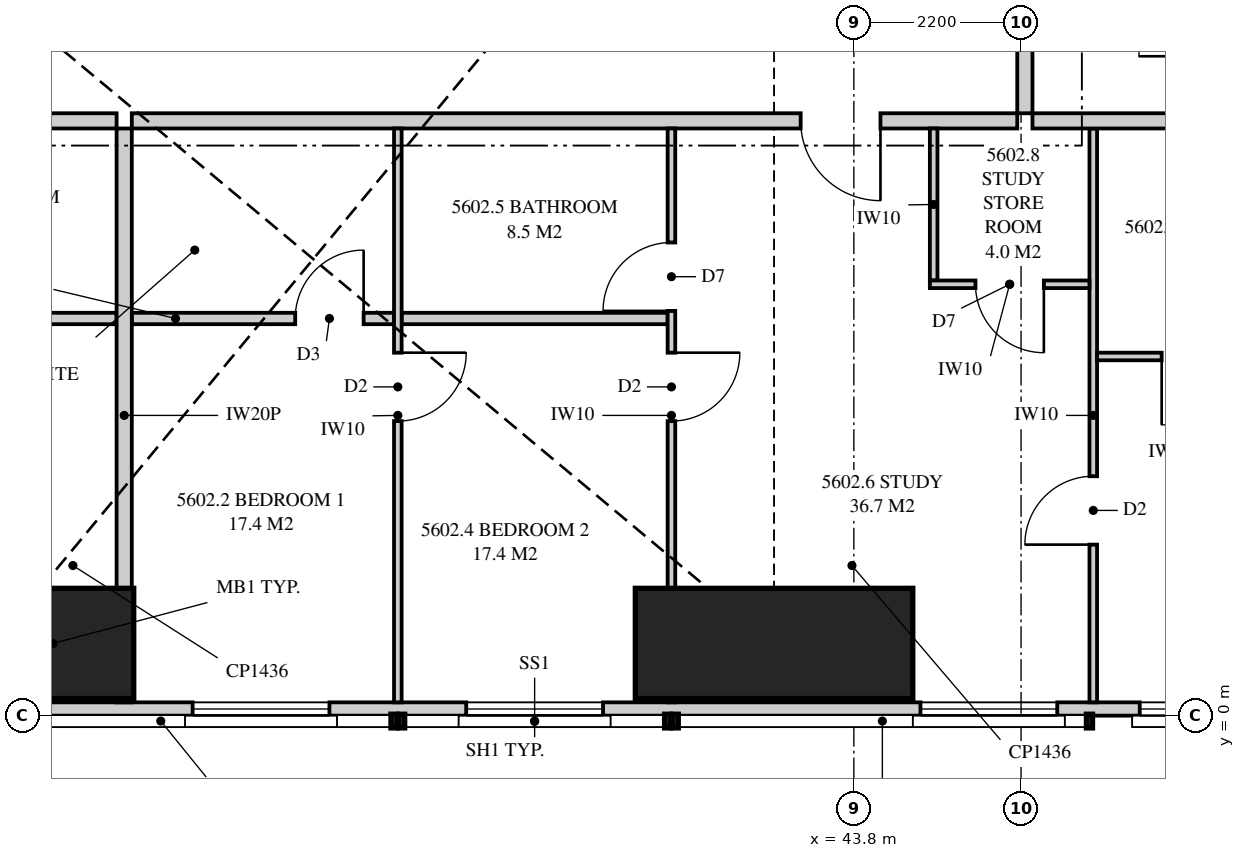
"""IFC4 building model, lengths in metres.
Left out: names, types, materials, properties, quantities, classifications, styles, units other than length and angle.
Written with IfcOpenShell. Run it as: python <this file> out.ifc"""

import sys

from ifc_helpers import new_model, si_unit, direction, frame, frame_2d, origin, origin_2d, place, context, subcontext, project, spatial, polyline, rectangle, outline, extrude, element, fill, save


model = new_model("IFC4")
c1 = context("Model", 3, precision=1e-05, world=origin(), true_north=direction((0.0, 1.0)))
c2 = subcontext(c1, "Body", "Model", "MODEL_VIEW")
j1 = project(units=[si_unit("LENGTHUNIT", "METRE"), si_unit("PLANEANGLEUNIT", "RADIAN")], contexts=[c1])
p1 = place(None, origin())
s1 = spatial("IfcSite", under=j1, at=p1, CompositionType="ELEMENT")
p2 = place(p1, origin())
s2 = spatial("IfcBuilding", under=s1, at=p2, CompositionType="ELEMENT")
p3 = place(p2, frame((0.0, 0.0, 204.6)))
s3 = spatial("IfcBuildingStorey", under=s2, at=p3, CompositionType="ELEMENT", Elevation=204.6)
for number, where, z_axis, x_axis in (
    (1, (32.5, 0.95, 0.0), (0.0, 0.0, 1.0), (0.0, 1.0, 0.0)),
    (2, (42.75, 0.95, 0.0), (0.0, 0.0, 1.0), (0.0, 1.0, 0.0)),
):
    element("IfcColumn", number, at=place(p3, frame(where, z_axis=z_axis, x_axis=x_axis)), inside=s3, PredefinedType="COLUMN", context=c2, shape_type="SweptSolid", body=[
        extrude(rectangle(XDim=1.45, YDim=3.65, at=origin_2d()), origin(), (0.0, 0.0, 1.0), 3.35),
    ])
p4 = place(p3, frame((15.051, 0.087, 0.0), z_axis=(0.0, 0.0, 1.0), x_axis=(1.0, 0.0, 0.0)))
e3 = element("IfcWall", 3, at=p4, inside=s3, PredefinedType="SOLIDWALL", context=c2, shape_type="SweptSolid", body=[
    extrude(rectangle(XDim=34.897, YDim=0.175, at=frame_2d((17.449, 0.0))), origin(), (0.0, 0.0, 1.0), 3.07),
])
p5 = place(p4, frame((0.699, 0.0, 0.4)))
e4 = element("IfcOpeningElement", 4, at=p5, cuts=e3, PredefinedType="OPENING", context=c2, shape_type="SweptSolid", body=[
    extrude(rectangle(XDim=1.8, YDim=1.7, at=frame_2d((0.9, 0.85))), frame((0.0, 0.097, 0.0), z_axis=(0.0, -1.0, 0.0), x_axis=(1.0, 0.0, 0.0)), (0.0, 0.0, 1.0), 0.195),
])
p6 = place(p4, frame((9.274, 0.0, 0.4)))
e5 = element("IfcOpeningElement", 5, at=p6, cuts=e3, PredefinedType="OPENING", context=c2, shape_type="SweptSolid", body=[
    extrude(rectangle(XDim=2.4, YDim=1.7, at=frame_2d((1.2, 0.85))), frame((0.0, 0.097, 0.0), z_axis=(0.0, -1.0, 0.0), x_axis=(1.0, 0.0, 0.0)), (0.0, 0.0, 1.0), 0.195),
])
p7 = place(p4, frame((13.561, 0.0, 0.0)))
e6 = element("IfcOpeningElement", 6, at=p7, cuts=e3, PredefinedType="OPENING", context=c2, shape_type="SweptSolid", body=[
    extrude(rectangle(XDim=1.8, YDim=2.1, at=frame_2d((0.9, 1.05))), frame((0.0, 0.097, 0.0), z_axis=(0.0, -1.0, 0.0), x_axis=(1.0, 0.0, 0.0)), (0.0, 0.0, 1.0), 0.195),
])
p8 = place(p4, frame((20.049, 0.0, 0.4)))
e7 = element("IfcOpeningElement", 7, at=p8, cuts=e3, PredefinedType="OPENING", context=c2, shape_type="SweptSolid", body=[
    extrude(rectangle(XDim=1.8, YDim=1.7, at=frame_2d((0.9, 0.85))), frame((0.0, 0.097, 0.0), z_axis=(0.0, -1.0, 0.0), x_axis=(1.0, 0.0, 0.0)), (0.0, 0.0, 1.0), 0.195),
])
p9 = place(p4, frame((23.649, 0.0, 0.4)))
e8 = element("IfcOpeningElement", 8, at=p9, cuts=e3, PredefinedType="OPENING", context=c2, shape_type="SweptSolid", body=[
    extrude(rectangle(XDim=1.8, YDim=1.7, at=frame_2d((0.9, 0.85))), frame((0.0, 0.097, 0.0), z_axis=(0.0, -1.0, 0.0), x_axis=(1.0, 0.0, 0.0)), (0.0, 0.0, 1.0), 0.195),
])
p10 = place(p4, frame((29.625, 0.0, 0.4)))
e9 = element("IfcOpeningElement", 9, at=p10, cuts=e3, PredefinedType="OPENING", context=c2, shape_type="SweptSolid", body=[
    extrude(rectangle(XDim=1.8, YDim=1.7, at=frame_2d((0.9, 0.85))), frame((0.0, 0.097, 0.0), z_axis=(0.0, -1.0, 0.0), x_axis=(1.0, 0.0, 0.0)), (0.0, 0.0, 1.0), 0.195),
])
p11 = place(p4, frame((32.51, 0.0, 0.4)))
e10 = element("IfcOpeningElement", 10, at=p11, cuts=e3, PredefinedType="OPENING", context=c2, shape_type="SweptSolid", body=[
    extrude(rectangle(XDim=1.8, YDim=1.7, at=frame_2d((0.9, 0.85))), frame((0.0, 0.097, 0.0), z_axis=(0.0, -1.0, 0.0), x_axis=(1.0, 0.0, 0.0)), (0.0, 0.0, 1.0), 0.195),
])
p12 = place(p3, frame((34.2, 0.175, 0.0), z_axis=(0.0, 0.0, 1.0), x_axis=(0.0, 1.0, 0.0)))
e11 = element("IfcWall", 11, at=p12, inside=s3, PredefinedType="PARTITIONING", context=c2, shape_type="SweptSolid", body=[
    extrude(outline(polyline([(0.0, 0.0), (7.55, 0.0), (7.55, 2.491), (7.515, 2.491), (7.515, 3.07), (3.319, 3.07), (3.319, 2.491), (2.337, 2.491), (2.337, 3.07), (1.275, 3.07), (1.275, 2.07), (0.275, 2.07), (0.275, 3.07), (0.0, 3.07), (0.0, 0.0)])), frame((0.0, 0.1, 0.0), z_axis=(0.0, -1.0, 0.0), x_axis=(1.0, 0.0, 0.0)), (0.0, 0.0, 1.0), 0.2),
])
p13 = place(p3, frame((28.4, 5.225, 0.0), z_axis=(0.0, 0.0, 1.0), x_axis=(1.0, 0.0, 0.0)))
e12 = element("IfcWall", 12, at=p13, inside=s3, PredefinedType="PLUMBINGWALL", context=c2, shape_type="SweptSolid", body=[
    extrude(outline(polyline([(0.0, 0.0), (5.7, 0.0), (5.7, 3.07), (4.356, 3.07), (4.356, 2.595), (3.844, 2.595), (3.844, 3.07), (0.408, 3.07), (0.408, 2.491), (0.0, 2.491), (0.0, 0.0)])), frame((0.0, 0.075, 0.0), z_axis=(0.0, -1.0, 0.0), x_axis=(1.0, 0.0, 0.0)), (0.0, 0.0, 1.0), 0.15),
])
p14 = place(p13, frame((0.4, 0.0, 0.0)))
e13 = element("IfcOpeningElement", 13, at=p14, cuts=e12, PredefinedType="OPENING", context=c2, shape_type="SweptSolid", body=[
    extrude(rectangle(XDim=0.9, YDim=2.1, at=frame_2d((0.45, 1.05))), frame((0.0, 0.085, 0.0), z_axis=(0.0, -1.0, 0.0), x_axis=(1.0, 0.0, 0.0)), (0.0, 0.0, 1.0), 0.17),
])
p15 = place(p3, frame((34.3, 7.825, 0.0), z_axis=(0.0, 0.0, 1.0), x_axis=(1.0, 0.0, 0.0)))
e14 = element("IfcWall", 14, at=p15, inside=s3, PredefinedType="PARTITIONING", context=c2, shape_type="SweptSolid", body=[
    extrude(outline(polyline([(0.0, 0.0), (11.65, 0.0), (11.65, 3.07), (9.16, 3.07), (9.16, 2.47), (7.74, 2.47), (7.74, 3.07), (4.282, 3.07), (4.282, 2.491), (3.503, 2.491), (3.503, 3.07), (0.696, 3.07), (0.696, 2.491), (0.0, 2.491), (0.0, 0.0)])), frame((0.0, 0.1, 0.0), z_axis=(0.0, -1.0, 0.0), x_axis=(1.0, 0.0, 0.0)), (0.0, 0.0, 1.0), 0.2),
])
p16 = place(p15, frame((8.8, 0.0, 0.0)))
e15 = element("IfcOpeningElement", 15, at=p16, cuts=e14, PredefinedType="OPENING", context=c2, shape_type="SweptSolid", body=[
    extrude(rectangle(XDim=1.05, YDim=2.2, at=frame_2d((0.525, 1.1))), frame((0.0, 0.11, 0.0), z_axis=(0.0, -1.0, 0.0), x_axis=(1.0, 0.0, 0.0)), (0.0, 0.0, 1.0), 0.22),
])
p17 = place(p3, frame((37.8, 0.175, 0.0), z_axis=(0.0, 0.0, 1.0), x_axis=(0.0, 1.0, 0.0)))
e16 = element("IfcWall", 16, at=p17, inside=s3, PredefinedType="PARTITIONING", context=c2, shape_type="SweptSolid", body=[
    extrude(outline(polyline([(0.0, 0.0), (7.55, 0.0), (7.55, 2.491), (6.746, 2.491), (6.746, 3.07), (5.253, 3.07), (5.253, 2.491), (4.554, 2.491), (4.554, 3.07), (1.275, 3.07), (1.275, 2.07), (0.275, 2.07), (0.275, 3.07), (0.0, 3.07), (0.0, 0.0)])), frame((0.0, 0.05, 0.0), z_axis=(0.0, -1.0, 0.0), x_axis=(1.0, 0.0, 0.0)), (0.0, 0.0, 1.0), 0.1),
])
p18 = place(p17, frame((3.7, 0.0, 0.0)))
e17 = element("IfcOpeningElement", 17, at=p18, cuts=e16, PredefinedType="OPENING", context=c2, shape_type="SweptSolid", body=[
    extrude(rectangle(XDim=0.9, YDim=2.1, at=frame_2d((0.45, 1.05))), frame((0.0, 0.06, 0.0), z_axis=(0.0, -1.0, 0.0), x_axis=(1.0, 0.0, 0.0)), (0.0, 0.0, 1.0), 0.12),
])
p19 = place(p3, frame((41.4, 0.175, 0.0), z_axis=(0.0, 0.0, 1.0), x_axis=(0.0, 1.0, 0.0)))
e18 = element("IfcWall", 18, at=p19, inside=s3, PredefinedType="PARTITIONING", context=c2, shape_type="SweptSolid", body=[
    extrude(outline(polyline([(7.55, 0.0), (7.55, 3.07), (2.25, 3.07), (2.25, 2.491), (1.552, 2.491), (1.552, 3.07), (1.275, 3.07), (1.275, 2.07), (1.021, 2.07), (1.021, 2.063), (0.529, 2.063), (0.529, 2.07), (0.275, 2.07), (0.275, 3.07), (0.0, 3.07), (0.0, 0.0), (0.529, 0.0), (0.529, 0.087), (1.021, 0.087), (1.021, 0.0), (7.55, 0.0)])), frame((0.0, 0.05, 0.0), z_axis=(0.0, -1.0, 0.0), x_axis=(1.0, 0.0, 0.0)), (0.0, 0.0, 1.0), 0.1),
])
p20 = place(p19, frame((3.7, 0.0, 0.0)))
e19 = element("IfcOpeningElement", 19, at=p20, cuts=e18, PredefinedType="OPENING", context=c2, shape_type="SweptSolid", body=[
    extrude(rectangle(XDim=0.9, YDim=2.1, at=frame_2d((0.45, 1.05))), frame((0.0, 0.06, 0.0), z_axis=(0.0, -1.0, 0.0), x_axis=(1.0, 0.0, 0.0)), (0.0, 0.0, 1.0), 0.12),
])
p21 = place(p19, frame((5.15, 0.0, 0.0)))
e20 = element("IfcOpeningElement", 20, at=p21, cuts=e18, PredefinedType="OPENING", context=c2, shape_type="SweptSolid", body=[
    extrude(rectangle(XDim=0.9, YDim=2.1, at=frame_2d((0.45, 1.05))), frame((0.0, 0.06, 0.0), z_axis=(0.0, -1.0, 0.0), x_axis=(1.0, 0.0, 0.0)), (0.0, 0.0, 1.0), 0.12),
])
p22 = place(p3, frame((34.3, 5.225, 0.0), z_axis=(0.0, 0.0, 1.0), x_axis=(1.0, 0.0, 0.0)))
e21 = element("IfcWall", 21, at=p22, inside=s3, PredefinedType="PLUMBINGWALL", context=c2, shape_type="SweptSolid", body=[
    extrude(outline(polyline([(0.0, 0.0), (3.45, 0.0), (3.45, 2.491), (2.866, 2.491), (2.866, 3.07), (2.108, 3.07), (2.108, 2.491), (1.371, 2.491), (1.371, 3.07), (0.0, 3.07), (0.0, 0.0)])), frame((0.0, 0.075, 0.0), z_axis=(0.0, -1.0, 0.0), x_axis=(1.0, 0.0, 0.0)), (0.0, 0.0, 1.0), 0.15),
])
p23 = place(p22, frame((2.15, 0.0, 0.0)))
e22 = element("IfcOpeningElement", 22, at=p23, cuts=e21, PredefinedType="OPENING", context=c2, shape_type="SweptSolid", body=[
    extrude(rectangle(XDim=0.9, YDim=2.1, at=frame_2d((0.45, 1.05))), frame((0.0, 0.085, 0.0), z_axis=(0.0, -1.0, 0.0), x_axis=(1.0, 0.0, 0.0)), (0.0, 0.0, 1.0), 0.17),
])
p24 = place(p3, frame((37.85, 5.225, 0.0), z_axis=(0.0, 0.0, 1.0), x_axis=(1.0, 0.0, 0.0)))
e23 = element("IfcWall", 23, at=p24, inside=s3, PredefinedType="PLUMBINGWALL", context=c2, shape_type="SweptSolid", body=[
    extrude(outline(polyline([(0.0, 0.0), (3.5, 0.0), (3.5, 3.07), (0.233, 3.07), (0.233, 2.491), (0.0, 2.491), (0.0, 0.0)])), frame((0.0, 0.075, 0.0), z_axis=(0.0, -1.0, 0.0), x_axis=(1.0, 0.0, 0.0)), (0.0, 0.0, 1.0), 0.15),
])
p25 = place(p3, frame((46.95, 0.175, 0.0), z_axis=(0.0, 0.0, 1.0), x_axis=(0.0, 1.0, 0.0)))
e24 = element("IfcWall", 24, at=p25, inside=s3, PredefinedType="PARTITIONING", context=c2, shape_type="SweptSolid", body=[
    extrude(outline(polyline([(0.0, 0.0), (7.55, 0.0), (7.55, 3.07), (2.035, 3.07), (2.035, 2.07), (1.002, 2.07), (1.002, 3.07), (0.0, 3.07), (0.0, 0.0)])), frame((0.0, 0.05, 0.0), z_axis=(0.0, -1.0, 0.0), x_axis=(1.0, 0.0, 0.0)), (0.0, 0.0, 1.0), 0.1),
])
p26 = place(p25, frame((2.075, 0.0, 0.0)))
e25 = element("IfcOpeningElement", 25, at=p26, cuts=e24, PredefinedType="OPENING", context=c2, shape_type="SweptSolid", body=[
    extrude(rectangle(XDim=0.9, YDim=2.1, at=frame_2d((0.45, 1.05))), frame((0.0, 0.06, 0.0), z_axis=(0.0, -1.0, 0.0), x_axis=(1.0, 0.0, 0.0)), (0.0, 0.0, 1.0), 0.12),
])
p27 = place(p3, frame((47.0, 4.725, 0.0), z_axis=(0.0, 0.0, 1.0), x_axis=(1.0, 0.0, 0.0)))
e26 = element("IfcWall", 26, at=p27, inside=s3, PredefinedType="PARTITIONING", context=c2, shape_type="SweptSolid", body=[
    extrude(rectangle(XDim=2.6, YDim=0.1, at=frame_2d((1.3, 0.0))), origin(), (0.0, 0.0, 1.0), 3.07),
])
p28 = place(p27, frame((0.85, 0.0, 0.0)))
e27 = element("IfcOpeningElement", 27, at=p28, cuts=e26, PredefinedType="OPENING", context=c2, shape_type="SweptSolid", body=[
    extrude(rectangle(XDim=0.9, YDim=2.1, at=frame_2d((0.45, 1.05))), frame((0.0, 0.06, 0.0), z_axis=(0.0, -1.0, 0.0), x_axis=(1.0, 0.0, 0.0)), (0.0, 0.0, 1.0), 0.12),
])
p29 = place(p3, frame((46.15, 7.825, 0.0), z_axis=(0.0, 0.0, 1.0), x_axis=(1.0, 0.0, 0.0)))
e28 = element("IfcWall", 28, at=p29, inside=s3, PredefinedType="PARTITIONING", context=c2, shape_type="SweptSolid", body=[
    extrude(outline(polyline([(0.0, 0.0), (6.85, 0.0), (6.85, 3.07), (5.738, 3.07), (5.738, 2.07), (4.703, 2.07), (4.703, 3.07), (0.0, 3.07), (0.0, 0.0)])), frame((0.0, 0.1, 0.0), z_axis=(0.0, -1.0, 0.0), x_axis=(1.0, 0.0, 0.0)), (0.0, 0.0, 1.0), 0.2),
])
p30 = place(p3, frame((46.05, 7.925, 0.0), z_axis=(0.0, 0.0, 1.0), x_axis=(0.0, 1.0, 0.0)))
e29 = element("IfcWall", 29, at=p30, inside=s3, PredefinedType="PARTITIONING", context=c2, shape_type="SweptSolid", body=[
    extrude(outline(polyline([(0.0, 0.0), (5.875, 0.0), (5.875, 3.07), (5.287, 3.07), (5.287, 2.595), (4.863, 2.595), (4.863, 3.07), (0.0, 3.07), (0.0, 0.0)])), frame((0.0, 0.1, 0.0), z_axis=(0.0, -1.0, 0.0), x_axis=(1.0, 0.0, 0.0)), (0.0, 0.0, 1.0), 0.2),
])
p31 = place(p30, frame((2.438, 0.0, 0.0)))
e30 = element("IfcOpeningElement", 30, at=p31, cuts=e29, PredefinedType="OPENING", context=c2, shape_type="SweptSolid", body=[
    extrude(rectangle(XDim=1.05, YDim=2.2, at=frame_2d((0.525, 1.1))), frame((0.0, 0.11, 0.0), z_axis=(0.0, -1.0, 0.0), x_axis=(1.0, 0.0, 0.0)), (0.0, 0.0, 1.0), 0.22),
])
p32 = place(p3, frame((24.5, 7.825, 0.0), z_axis=(0.0, 0.0, 1.0), x_axis=(1.0, 0.0, 0.0)))
e31 = element("IfcWall", 31, at=p32, inside=s3, PredefinedType="PARTITIONING", context=c2, shape_type="SweptSolid", body=[
    extrude(outline(polyline([(0.0, 0.0), (9.6, 0.0), (9.6, 2.491), (9.519, 2.491), (9.519, 3.07), (8.257, 3.07), (8.257, 2.595), (7.743, 2.595), (7.743, 3.07), (5.097, 3.07), (5.097, 2.491), (4.227, 2.491), (4.227, 3.07), (1.843, 3.07), (1.843, 2.491), (0.998, 2.491), (0.998, 3.07), (0.0, 3.07), (0.0, 0.0)])), frame((0.0, 0.1, 0.0), z_axis=(0.0, -1.0, 0.0), x_axis=(1.0, 0.0, 0.0)), (0.0, 0.0, 1.0), 0.2),
])
p33 = place(p3, frame((46.9, 5.675, 0.0), z_axis=(0.0, 0.0, 1.0), x_axis=(-1.0, 0.0, 0.0)))
e32 = element("IfcWall", 32, at=p33, inside=s3, PredefinedType="PARTITIONING", context=c2, shape_type="SweptSolid", body=[
    extrude(rectangle(XDim=2.1, YDim=0.1, at=frame_2d((1.05, 0.0))), origin(), (0.0, 0.0, 1.0), 3.07),
])
p34 = place(p33, frame((0.6, 0.0, 0.0)))
e33 = element("IfcOpeningElement", 33, at=p34, cuts=e32, PredefinedType="OPENING", context=c2, shape_type="SweptSolid", body=[
    extrude(rectangle(XDim=0.9, YDim=2.1, at=frame_2d((0.45, 1.05))), frame((0.0, 0.06, 0.0), z_axis=(0.0, -1.0, 0.0), x_axis=(1.0, 0.0, 0.0)), (0.0, 0.0, 1.0), 0.12),
])
p35 = place(p3, frame((44.85, 7.725, 0.0), z_axis=(0.0, 0.0, 1.0), x_axis=(0.0, -1.0, 0.0)))
e34 = element("IfcWall", 34, at=p35, inside=s3, PredefinedType="PARTITIONING", context=c2, shape_type="SweptSolid", body=[
    extrude(rectangle(XDim=2.0, YDim=0.1, at=frame_2d((1.0, 0.0))), origin(), (0.0, 0.0, 1.0), 3.07),
])
p36 = place(p8, origin())
e35 = element("IfcWindow", 35, at=p36, inside=s3, PartitioningType="SINGLE_PANEL", PredefinedType="WINDOW", context=c2, shape_type="SweptSolid", body=[
    extrude(rectangle(XDim=1.8, YDim=1.7, at=frame_2d((0.9, 0.85))), frame((0.0, 0.03, 0.0), z_axis=(0.0, -1.0, 0.0), x_axis=(1.0, 0.0, 0.0)), (0.0, 0.0, 1.0), 0.06),
])
fill(e7, e35)
p37 = place(p9, origin())
e36 = element("IfcWindow", 36, at=p37, inside=s3, PartitioningType="SINGLE_PANEL", PredefinedType="WINDOW", context=c2, shape_type="SweptSolid", body=[
    extrude(rectangle(XDim=1.8, YDim=1.7, at=frame_2d((0.9, 0.85))), frame((0.0, 0.03, 0.0), z_axis=(0.0, -1.0, 0.0), x_axis=(1.0, 0.0, 0.0)), (0.0, 0.0, 1.0), 0.06),
])
fill(e8, e36)
p38 = place(p10, origin())
e37 = element("IfcWindow", 37, at=p38, inside=s3, PartitioningType="SINGLE_PANEL", PredefinedType="WINDOW", context=c2, shape_type="SweptSolid", body=[
    extrude(rectangle(XDim=1.8, YDim=1.7, at=frame_2d((0.9, 0.85))), frame((0.0, 0.03, 0.0), z_axis=(0.0, -1.0, 0.0), x_axis=(1.0, 0.0, 0.0)), (0.0, 0.0, 1.0), 0.06),
])
fill(e9, e37)
p39 = place(p11, origin())
e38 = element("IfcWindow", 38, at=p39, inside=s3, PartitioningType="SINGLE_PANEL", PredefinedType="WINDOW", context=c2, shape_type="SweptSolid", body=[
    extrude(rectangle(XDim=1.8, YDim=1.7, at=frame_2d((0.9, 0.85))), frame((0.0, 0.03, 0.0), z_axis=(0.0, -1.0, 0.0), x_axis=(1.0, 0.0, 0.0)), (0.0, 0.0, 1.0), 0.06),
])
fill(e10, e38)
p40 = place(p16, frame((1.05, 0.0, 0.0), z_axis=(0.0, 0.0, 1.0), x_axis=(-1.0, 0.0, 0.0)))
e39 = element("IfcDoor", 39, at=p40, inside=s3, OperationType="SINGLE_SWING_LEFT", PredefinedType="DOOR", context=c2, shape_type="SweptSolid", body=[
    extrude(rectangle(XDim=1.05, YDim=2.2, at=frame_2d((0.525, 1.1))), frame((0.0, 0.025, 0.0), z_axis=(0.0, -1.0, 0.0), x_axis=(1.0, 0.0, 0.0)), (0.0, 0.0, 1.0), 0.05),
])
fill(e15, e39)
p41 = place(p18, frame((0.9, 0.0, 0.0), z_axis=(0.0, 0.0, 1.0), x_axis=(-1.0, 0.0, 0.0)))
e40 = element("IfcDoor", 40, at=p41, inside=s3, OperationType="SINGLE_SWING_LEFT", PredefinedType="DOOR", context=c2, shape_type="SweptSolid", body=[
    extrude(rectangle(XDim=0.9, YDim=2.1, at=frame_2d((0.45, 1.05))), frame((0.0, 0.025, 0.0), z_axis=(0.0, -1.0, 0.0), x_axis=(1.0, 0.0, 0.0)), (0.0, 0.0, 1.0), 0.05),
])
fill(e17, e40)
p42 = place(p23, origin())
e41 = element("IfcDoor", 41, at=p42, inside=s3, OperationType="SINGLE_SWING_RIGHT", PredefinedType="DOOR", context=c2, shape_type="SweptSolid", body=[
    extrude(rectangle(XDim=0.9, YDim=2.1, at=frame_2d((0.45, 1.05))), frame((0.0, 0.025, 0.0), z_axis=(0.0, -1.0, 0.0), x_axis=(1.0, 0.0, 0.0)), (0.0, 0.0, 1.0), 0.05),
])
fill(e22, e41)
p43 = place(p20, frame((0.9, 0.0, 0.0), z_axis=(0.0, 0.0, 1.0), x_axis=(-1.0, 0.0, 0.0)))
e42 = element("IfcDoor", 42, at=p43, inside=s3, OperationType="SINGLE_SWING_LEFT", PredefinedType="DOOR", context=c2, shape_type="SweptSolid", body=[
    extrude(rectangle(XDim=0.9, YDim=2.1, at=frame_2d((0.45, 1.05))), frame((0.0, 0.025, 0.0), z_axis=(0.0, -1.0, 0.0), x_axis=(1.0, 0.0, 0.0)), (0.0, 0.0, 1.0), 0.05),
])
fill(e19, e42)
p44 = place(p21, origin())
e43 = element("IfcDoor", 43, at=p44, inside=s3, OperationType="SINGLE_SWING_LEFT", PredefinedType="DOOR", context=c2, shape_type="SweptSolid", body=[
    extrude(rectangle(XDim=0.9, YDim=2.1, at=frame_2d((0.45, 1.05))), frame((0.0, 0.025, 0.0), z_axis=(0.0, -1.0, 0.0), x_axis=(1.0, 0.0, 0.0)), (0.0, 0.0, 1.0), 0.05),
])
fill(e20, e43)
p45 = place(p26, origin())
e44 = element("IfcDoor", 44, at=p45, inside=s3, OperationType="SINGLE_SWING_LEFT", PredefinedType="DOOR", context=c2, shape_type="SweptSolid", body=[
    extrude(rectangle(XDim=0.9, YDim=2.1, at=frame_2d((0.45, 1.05))), frame((0.0, 0.025, 0.0), z_axis=(0.0, -1.0, 0.0), x_axis=(1.0, 0.0, 0.0)), (0.0, 0.0, 1.0), 0.05),
])
fill(e25, e44)
p46 = place(p28, frame((0.9, 0.0, 0.0), z_axis=(0.0, 0.0, 1.0), x_axis=(-1.0, 0.0, 0.0)))
e45 = element("IfcDoor", 45, at=p46, inside=s3, OperationType="SINGLE_SWING_RIGHT", PredefinedType="DOOR", context=c2, shape_type="SweptSolid", body=[
    extrude(rectangle(XDim=0.9, YDim=2.1, at=frame_2d((0.45, 1.05))), frame((0.0, 0.025, 0.0), z_axis=(0.0, -1.0, 0.0), x_axis=(1.0, 0.0, 0.0)), (0.0, 0.0, 1.0), 0.05),
])
fill(e27, e45)
p47 = place(p34, origin())
e46 = element("IfcDoor", 46, at=p47, inside=s3, OperationType="SINGLE_SWING_LEFT", PredefinedType="DOOR", context=c2, shape_type="SweptSolid", body=[
    extrude(rectangle(XDim=0.9, YDim=2.1, at=frame_2d((0.45, 1.05))), frame((0.0, 0.025, 0.0), z_axis=(0.0, -1.0, 0.0), x_axis=(1.0, 0.0, 0.0)), (0.0, 0.0, 1.0), 0.05),
])
fill(e33, e46)
save(model, sys.argv[1])
